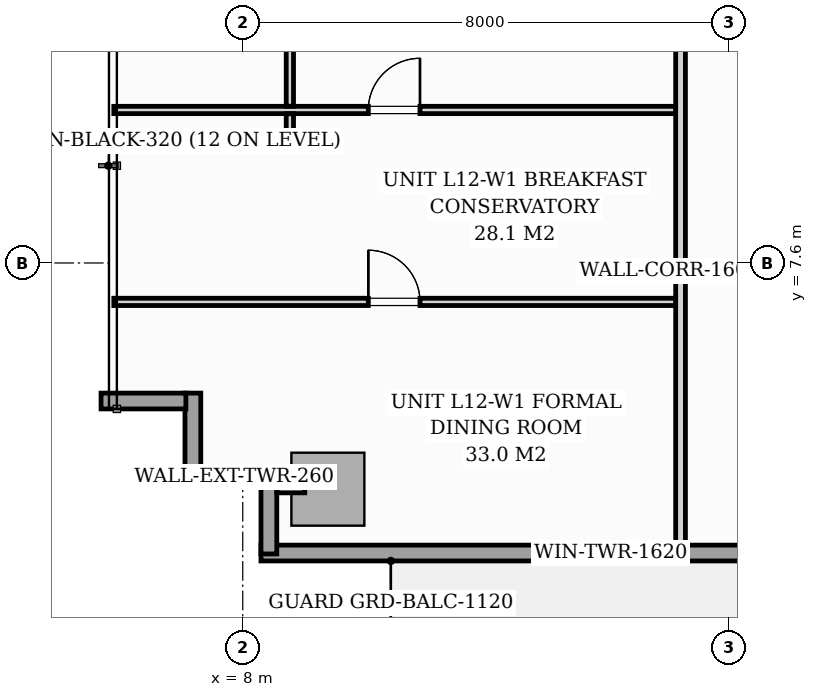
"""IFC4 building model, lengths in metres.
Left out: names, types, materials, properties, quantities, classifications, styles, units other than length and angle.
Written with IfcOpenShell. Run it as: python <this file> out.ifc"""

import sys

from ifc_helpers import new_model, si_unit, direction, frame, frame_2d, origin, origin_2d, place, context, subcontext, project, spatial, rectangle, extrude, source, transform, mapped, element, fill, save


model = new_model("IFC4")
c1 = context("Model", 3, precision=1e-05, world=origin(), true_north=direction((0.0, 1.0)))
c2 = subcontext(c1, "Body", "Model", "MODEL_VIEW")
j1 = project(units=[si_unit("LENGTHUNIT", "METRE"), si_unit("PLANEANGLEUNIT", "RADIAN")], contexts=[c1])
p1 = place(None, origin())
s1 = spatial("IfcSite", under=j1, at=p1, CompositionType="ELEMENT")
p2 = place(p1, origin())
s2 = spatial("IfcBuilding", under=s1, at=p2, CompositionType="ELEMENT")
p3 = place(p2, frame((0.0, 0.0, 45.4)))
s3 = spatial("IfcBuildingStorey", under=s2, at=p3, CompositionType="ELEMENT", Elevation=45.4)
m1 = source(origin(), c2, "Body", "SweptSolid", [
    extrude(rectangle(XDim=1.2, YDim=1.2, at=origin_2d()), origin(), (0.0, 0.0, 1.0), 3.196),
])
p4 = place(p3, frame((9.4, 3.88, 0.002), z_axis=(0.0, 0.0, 1.0), x_axis=(1.0, 0.0, 0.0)))
e1 = element("IfcColumn", 1, at=p4, inside=s3, PredefinedType="COLUMN", context=c2, shape_type="MappedRepresentation", body=[
    mapped(m1, transform((0.0, 0.0, 0.0), scale=1.0)),
])
p5 = place(p3, frame((8.798, 4.08, 0.0), z_axis=(0.0, 0.0, 1.0), x_axis=(-1.0, 0.0, 0.0)))
e2 = element("IfcWall", 2, at=p5, inside=s3, PredefinedType="STANDARD", context=c2, shape_type="SweptSolid", body=[
    extrude(rectangle(XDim=1.878, YDim=0.26, at=frame_2d((0.939, 0.0))), origin(), (0.0, 0.0, 1.0), 2.94),
])
for number, where, z_axis, x_axis in (
    (3, (7.18, 4.065, 0.0), (0.0, 0.0, 1.0), (0.0, 1.0, 0.0)),
    (4, (7.065, 5.33, 0.0), (0.0, 0.0, 1.0), (-1.0, 0.0, 0.0)),
):
    element("IfcWall", number, at=place(p3, frame(where, z_axis=z_axis, x_axis=x_axis)), inside=s3, PredefinedType="STANDARD", context=c2, shape_type="SweptSolid", body=[
        extrude(rectangle(XDim=1.395, YDim=0.26, at=frame_2d((0.698, 0.0))), origin(), (0.0, 0.0, 1.0), 2.94),
    ])
p6 = place(p3, frame((25.45, 2.83, 0.0), z_axis=(0.0, 0.0, 1.0), x_axis=(-1.0, 0.0, 0.0)))
e5 = element("IfcWall", 5, at=p6, inside=s3, PredefinedType="STANDARD", context=c2, shape_type="SweptSolid", body=[
    extrude(rectangle(XDim=17.15, YDim=0.26, at=frame_2d((8.575, 0.0))), origin(), (0.0, 0.0, 1.0), 2.94),
])
p7 = place(p6, frame((6.79, 0.0, 0.0)))
e6 = element("IfcOpeningElement", 6, at=p7, cuts=e5, PredefinedType="OPENING", context=c2, shape_type="SweptSolid", body=[
    extrude(rectangle(XDim=1.8, YDim=2.06, at=frame_2d((0.9, 1.03))), frame((0.0, 0.14, 0.0), z_axis=(0.0, -1.0, 0.0), x_axis=(1.0, 0.0, 0.0)), (0.0, 0.0, 1.0), 0.28),
])
p8 = place(p6, frame((10.6, 0.0, 0.65)))
e7 = element("IfcOpeningElement", 7, at=p8, cuts=e5, PredefinedType="OPENING", context=c2, shape_type="SweptSolid", body=[
    extrude(rectangle(XDim=1.6, YDim=1.5, at=frame_2d((0.8, 0.75))), frame((0.0, 0.14, 0.0), z_axis=(0.0, -1.0, 0.0), x_axis=(1.0, 0.0, 0.0)), (0.0, 0.0, 1.0), 0.28),
])
p9 = place(p6, frame((0.413, 0.0, 0.75)))
e8 = element("IfcOpeningElement", 8, at=p9, cuts=e5, PredefinedType="OPENING", context=c2, shape_type="SweptSolid", body=[
    extrude(rectangle(XDim=1.6, YDim=1.5, at=frame_2d((0.8, 0.75))), frame((0.0, 0.14, 0.0), z_axis=(0.0, -1.0, 0.0), x_axis=(1.0, 0.0, 0.0)), (0.0, 0.0, 1.0), 0.28),
])
p10 = place(p3, frame((8.43, 2.815, 0.0), z_axis=(0.0, 0.0, 1.0), x_axis=(0.0, 1.0, 0.0)))
e9 = element("IfcWall", 9, at=p10, inside=s3, PredefinedType="STANDARD", context=c2, shape_type="SweptSolid", body=[
    extrude(rectangle(XDim=1.395, YDim=0.26, at=frame_2d((0.698, 0.0))), origin(), (0.0, 0.0, 1.0), 2.94),
])
p11 = place(p3, frame((15.2, 2.962, 0.0), z_axis=(0.0, 0.0, 1.0), x_axis=(0.0, 1.0, 0.0)))
e10 = element("IfcWall", 10, at=p11, inside=s3, PredefinedType="PARTITIONING", context=c2, shape_type="SweptSolid", body=[
    extrude(rectangle(XDim=9.586, YDim=0.16, at=frame_2d((4.793, 0.0))), origin(), (0.0, 0.0, 1.0), 2.94),
])
p12 = place(p3, frame((5.88, 6.96, 0.0), z_axis=(0.0, 0.0, 1.0), x_axis=(1.0, 0.0, 0.0)))
e11 = element("IfcWall", 11, at=p12, inside=s3, PredefinedType="PARTITIONING", context=c2, shape_type="SweptSolid", body=[
    extrude(rectangle(XDim=9.238, YDim=0.12, at=frame_2d((4.619, 0.0))), origin(), (0.0, 0.0, 1.0), 2.94),
])
p13 = place(p12, frame((4.185, 0.0, 0.0)))
e12 = element("IfcOpeningElement", 12, at=p13, cuts=e11, PredefinedType="OPENING", context=c2, shape_type="SweptSolid", body=[
    extrude(rectangle(XDim=0.85, YDim=2.05, at=frame_2d((0.425, 1.025))), frame((0.0, 0.07, 0.0), z_axis=(0.0, -1.0, 0.0), x_axis=(1.0, 0.0, 0.0)), (0.0, 0.0, 1.0), 0.14),
])
p14 = place(p3, frame((5.88, 10.116, 0.0), z_axis=(0.0, 0.0, 1.0), x_axis=(1.0, 0.0, 0.0)))
e13 = element("IfcWall", 13, at=p14, inside=s3, PredefinedType="PARTITIONING", context=c2, shape_type="SweptSolid", body=[
    extrude(rectangle(XDim=9.238, YDim=0.12, at=frame_2d((4.619, 0.0))), origin(), (0.0, 0.0, 1.0), 2.94),
])
p15 = place(p14, frame((4.185, 0.0, 0.0)))
e14 = element("IfcOpeningElement", 14, at=p15, cuts=e13, PredefinedType="OPENING", context=c2, shape_type="SweptSolid", body=[
    extrude(rectangle(XDim=0.85, YDim=2.05, at=frame_2d((0.425, 1.025))), frame((0.0, 0.07, 0.0), z_axis=(0.0, -1.0, 0.0), x_axis=(1.0, 0.0, 0.0)), (0.0, 0.0, 1.0), 0.14),
])
p16 = place(p3, frame((8.775, 9.676, 0.0), z_axis=(0.0, 0.0, 1.0), x_axis=(0.0, 1.0, 0.0)))
e15 = element("IfcWall", 15, at=p16, inside=s3, PredefinedType="PARTITIONING", context=c2, shape_type="SweptSolid", body=[
    extrude(rectangle(XDim=0.378, YDim=0.12, at=frame_2d((0.189, 0.0))), origin(), (0.0, 0.0, 1.0), 2.94),
])
p17 = place(p3, frame((8.775, 10.178, 0.0), z_axis=(0.0, 0.0, 1.0), x_axis=(0.0, 1.0, 0.0)))
e16 = element("IfcWall", 16, at=p17, inside=s3, PredefinedType="PARTITIONING", context=c2, shape_type="SweptSolid", body=[
    extrude(rectangle(XDim=10.83, YDim=0.12, at=frame_2d((5.415, 0.0))), origin(), (0.0, 0.0, 1.0), 2.94),
])
p18 = place(p17, frame((5.86, 0.0, 0.0)))
e17 = element("IfcOpeningElement", 17, at=p18, cuts=e16, PredefinedType="OPENING", context=c2, shape_type="SweptSolid", body=[
    extrude(rectangle(XDim=0.85, YDim=2.05, at=frame_2d((0.425, 1.025))), frame((0.0, 0.07, 0.0), z_axis=(0.0, -1.0, 0.0), x_axis=(1.0, 0.0, 0.0)), (0.0, 0.0, 1.0), 0.14),
])
p19 = place(p3, frame((9.02, 3.88, 0.0), z_axis=(0.0, 0.0, 1.0), x_axis=(-1.0, 0.0, 0.0)))
e18 = element("IfcWall", 18, at=p19, inside=s3, PredefinedType="PARTITIONING", context=c2, shape_type="SweptSolid", body=[
    extrude(rectangle(XDim=0.458, YDim=0.12, at=frame_2d((0.229, 0.0))), origin(), (0.0, 0.0, 1.0), 2.94),
])
m2 = source(origin(), c2, "Body", "SweptSolid", [
    extrude(rectangle(XDim=1.6, YDim=1.5, at=frame_2d((0.8, 0.75))), frame((0.0, 0.03, 0.0), z_axis=(0.0, -1.0, 0.0), x_axis=(1.0, 0.0, 0.0)), (0.0, 0.0, 1.0), 0.06),
])
p20 = place(p8, origin())
e19 = element("IfcWindow", 19, at=p20, inside=s3, PartitioningType="SINGLE_PANEL", PredefinedType="WINDOW", context=c2, shape_type="MappedRepresentation", body=[
    mapped(m2, transform((0.0, 0.0, 0.0), scale=1.0)),
])
fill(e7, e19)
m3 = source(origin(), c2, "Body", "SweptSolid", [
    extrude(rectangle(XDim=0.85, YDim=2.05, at=frame_2d((0.425, 1.025))), frame((0.0, 0.025, 0.0), z_axis=(0.0, -1.0, 0.0), x_axis=(1.0, 0.0, 0.0)), (0.0, 0.0, 1.0), 0.05),
])
p21 = place(p13, origin())
e20 = element("IfcDoor", 20, at=p21, inside=s3, OperationType="SINGLE_SWING_LEFT", PredefinedType="DOOR", context=c2, shape_type="MappedRepresentation", body=[
    mapped(m3, transform((0.0, 0.0, 0.0), scale=1.0)),
])
fill(e12, e20)
p22 = place(p15, origin())
e21 = element("IfcDoor", 21, at=p22, inside=s3, OperationType="SINGLE_SWING_RIGHT", PredefinedType="DOOR", context=c2, shape_type="MappedRepresentation", body=[
    mapped(m3, transform((0.0, 0.0, 0.0), scale=1.0)),
])
fill(e14, e21)
save(model, sys.argv[1])
